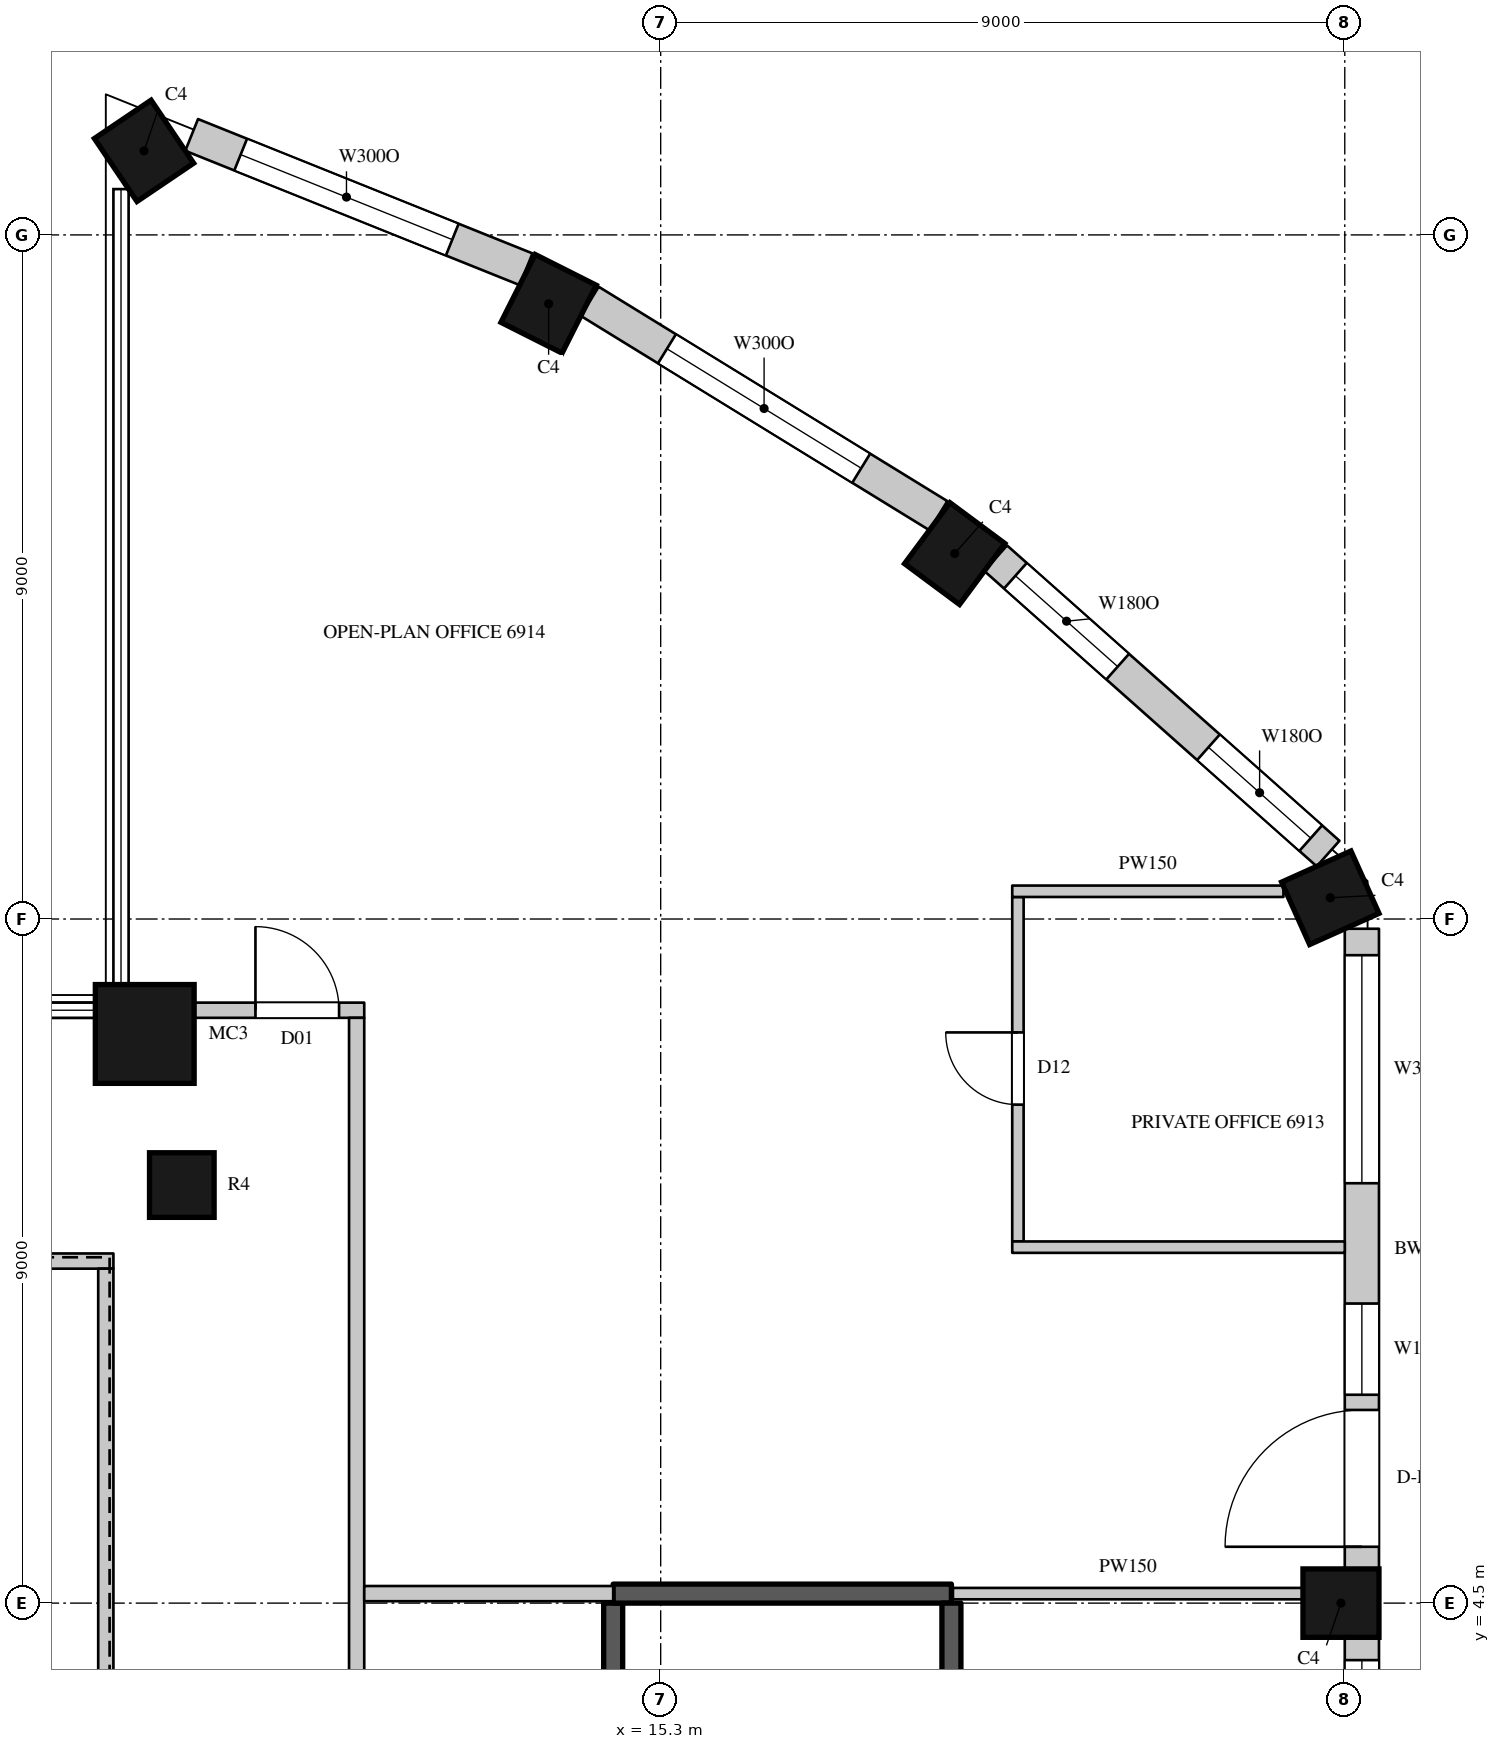
"""IFC4 building model, lengths in metres.
Left out: names, types, materials, properties, quantities, classifications, styles, units other than length and angle.
Written with IfcOpenShell. Run it as: python <this file> out.ifc"""

import sys

from ifc_helpers import new_model, si_unit, direction, frame, frame_2d, origin, origin_2d, place, context, subcontext, project, spatial, rectangle, circle, extrude, element, fill, save


model = new_model("IFC4")
c1 = context("Model", 3, precision=1e-05, world=origin(), true_north=direction((0.0, 1.0)))
c2 = subcontext(c1, "Body", "Model", "MODEL_VIEW")
j1 = project(units=[si_unit("LENGTHUNIT", "METRE"), si_unit("PLANEANGLEUNIT", "RADIAN")], contexts=[c1])
p1 = place(None, origin())
s1 = spatial("IfcSite", under=j1, at=p1, CompositionType="ELEMENT")
p2 = place(p1, origin())
s2 = spatial("IfcBuilding", under=s1, at=p2, CompositionType="ELEMENT")
p3 = place(p2, frame((0.0, 0.0, 304.9)))
s3 = spatial("IfcBuildingStorey", under=s2, at=p3, CompositionType="ELEMENT", Elevation=304.9)
p4 = place(p3, frame((8.503, 23.606, 0.0), z_axis=(0.0, 0.0, 1.0), x_axis=(-0.828469606019, -0.560034027451, 0.0)))
e1 = element("IfcColumn", 1, at=p4, inside=s3, PredefinedType="COLUMN", context=c2, shape_type="SweptSolid", body=[
    extrude(rectangle(XDim=0.9, YDim=1.0, at=origin_2d()), origin(), (0.0, 0.0, 1.0), 4.1),
])
p5 = place(p3, frame((8.512, 11.988, 0.0), z_axis=(0.0, 0.0, 1.0), x_axis=(1.0, 0.0, 0.0)))
e2 = element("IfcColumn", 2, at=p5, inside=s3, PredefinedType="COLUMN", context=c2, shape_type="SweptSolid", body=[
    extrude(circle(Radius=0.65, at=origin_2d()), origin(), (0.0, 0.0, 1.0), 4.1),
])
for number, where, z_axis, x_axis in (
    (3, (24.25, 4.5, 0.0), (0.0, 0.0, 1.0), (0.0, 1.0, 0.0)),
    (4, (24.11, 13.78, 0.0), (0.0, 0.0, 1.0), (-0.41, 0.912, 0.0)),
    (5, (19.168, 18.308, 0.0), (0.0, 0.0, 1.0), (-0.803, 0.596, 0.0)),
    (6, (13.826, 21.594, 0.0), (0.0, 0.0, 1.0), (-0.893, 0.45, 0.0)),
):
    element("IfcColumn", number, at=place(p3, frame(where, z_axis=z_axis, x_axis=x_axis)), inside=s3, PredefinedType="COLUMN", context=c2, shape_type="SweptSolid", body=[
        extrude(rectangle(XDim=0.9, YDim=1.0, at=origin_2d()), origin(), (0.0, 0.0, 1.0), 4.1),
    ])
p6 = place(p3, frame((9.0, 10.0, 0.0), z_axis=(0.0, 0.0, 1.0), x_axis=(1.0, 0.0, 0.0)))
e7 = element("IfcColumn", 7, at=p6, inside=s3, PredefinedType="COLUMN", context=c2, shape_type="SweptSolid", body=[
    extrude(circle(Radius=0.425, at=origin_2d()), origin(), (0.0, 0.0, 1.0), 4.1),
])
p7 = place(p3, frame((24.525, -4.05, 0.0), z_axis=(0.0, 0.0, 1.0), x_axis=(0.0, 1.0, 0.0)))
e8 = element("IfcWall", 8, at=p7, inside=s3, PredefinedType="SOLIDWALL", context=c2, shape_type="SweptSolid", body=[
    extrude(rectangle(XDim=8.1, YDim=0.45, at=frame_2d((4.05, 0.0))), origin(), (0.0, 0.0, 1.0), 3.8),
])
p8 = place(p7, frame((0.3, 0.0, 1.05)))
e9 = element("IfcOpeningElement", 9, at=p8, cuts=e8, PredefinedType="OPENING", context=c2, shape_type="SweptSolid", body=[
    extrude(rectangle(XDim=3.0, YDim=2.4, at=frame_2d((1.5, 1.2))), frame((0.0, 0.235, 0.0), z_axis=(0.0, -1.0, 0.0), x_axis=(1.0, 0.0, 0.0)), (0.0, 0.0, 1.0), 0.47),
])
p9 = place(p7, frame((4.8, 0.0, 1.05)))
e10 = element("IfcOpeningElement", 10, at=p9, cuts=e8, PredefinedType="OPENING", context=c2, shape_type="SweptSolid", body=[
    extrude(rectangle(XDim=3.0, YDim=2.4, at=frame_2d((1.5, 1.2))), frame((0.0, 0.235, 0.0), z_axis=(0.0, -1.0, 0.0), x_axis=(1.0, 0.0, 0.0)), (0.0, 0.0, 1.0), 0.47),
])
p10 = place(p3, frame((24.525, 4.95, 0.0), z_axis=(0.0, 0.0, 1.0), x_axis=(0.0, 1.0, 0.0)))
e11 = element("IfcWall", 11, at=p10, inside=s3, PredefinedType="SOLIDWALL", context=c2, shape_type="SweptSolid", body=[
    extrude(rectangle(XDim=8.422, YDim=0.45, at=frame_2d((4.211, 0.0))), origin(), (0.0, 0.0, 1.0), 3.8),
])
p11 = place(p10, frame((0.291, 0.0, 0.0)))
e12 = element("IfcOpeningElement", 12, at=p11, cuts=e11, PredefinedType="OPENING", context=c2, shape_type="SweptSolid", body=[
    extrude(rectangle(XDim=1.8, YDim=2.4, at=frame_2d((0.9, 1.2))), frame((0.0, 0.235, 0.0), z_axis=(0.0, -1.0, 0.0), x_axis=(1.0, 0.0, 0.0)), (0.0, 0.0, 1.0), 0.47),
])
p12 = place(p10, frame((2.291, 0.0, 1.05)))
e13 = element("IfcOpeningElement", 13, at=p12, cuts=e11, PredefinedType="OPENING", context=c2, shape_type="SweptSolid", body=[
    extrude(rectangle(XDim=1.2, YDim=2.4, at=frame_2d((0.6, 1.2))), frame((0.0, 0.235, 0.0), z_axis=(0.0, -1.0, 0.0), x_axis=(1.0, 0.0, 0.0)), (0.0, 0.0, 1.0), 0.47),
])
p13 = place(p10, frame((5.074, 0.0, 1.05)))
e14 = element("IfcOpeningElement", 14, at=p13, cuts=e11, PredefinedType="OPENING", context=c2, shape_type="SweptSolid", body=[
    extrude(rectangle(XDim=3.0, YDim=2.4, at=frame_2d((1.5, 1.2))), frame((0.0, 0.235, 0.0), z_axis=(0.0, -1.0, 0.0), x_axis=(1.0, 0.0, 0.0)), (0.0, 0.0, 1.0), 0.47),
])
p14 = place(p3, frame((24.081, 14.361, 0.0), z_axis=(0.0, 0.0, 1.0), x_axis=(-0.747570482973, 0.664182484704, 0.0)))
e15 = element("IfcWall", 15, at=p14, inside=s3, PredefinedType="SOLIDWALL", context=c2, shape_type="SweptSolid", body=[
    extrude(rectangle(XDim=5.85, YDim=0.45, at=frame_2d((2.925, 0.0))), origin(), (0.0, 0.0, 1.0), 3.8),
])
p15 = place(p14, frame((0.305, 0.0, 1.05)))
e16 = element("IfcOpeningElement", 16, at=p15, cuts=e15, PredefinedType="OPENING", context=c2, shape_type="SweptSolid", body=[
    extrude(rectangle(XDim=1.8, YDim=2.4, at=frame_2d((0.9, 1.2))), frame((0.0, 0.235, 0.0), z_axis=(0.0, -1.0, 0.0), x_axis=(1.0, 0.0, 0.0)), (0.0, 0.0, 1.0), 0.47),
])
p16 = place(p14, frame((3.703, 0.0, 1.05)))
e17 = element("IfcOpeningElement", 17, at=p16, cuts=e15, PredefinedType="OPENING", context=c2, shape_type="SweptSolid", body=[
    extrude(rectangle(XDim=1.8, YDim=2.4, at=frame_2d((0.9, 1.2))), frame((0.0, 0.235, 0.0), z_axis=(0.0, -1.0, 0.0), x_axis=(1.0, 0.0, 0.0)), (0.0, 0.0, 1.0), 0.47),
])
p17 = place(p3, frame((18.953, 18.806, 0.0), z_axis=(0.0, 0.0, 1.0), x_axis=(-0.851860664503, 0.523768468193, 0.0)))
e18 = element("IfcWall", 18, at=p17, inside=s3, PredefinedType="SOLIDWALL", context=c2, shape_type="SweptSolid", body=[
    extrude(rectangle(XDim=5.384, YDim=0.45, at=frame_2d((2.692, 0.0))), origin(), (0.0, 0.0, 1.0), 3.8),
])
p18 = place(p17, frame((1.192, 0.0, 1.05)))
e19 = element("IfcOpeningElement", 19, at=p18, cuts=e18, PredefinedType="OPENING", context=c2, shape_type="SweptSolid", body=[
    extrude(rectangle(XDim=3.0, YDim=2.4, at=frame_2d((1.5, 1.2))), frame((0.0, 0.235, 0.0), z_axis=(0.0, -1.0, 0.0), x_axis=(1.0, 0.0, 0.0)), (0.0, 0.0, 1.0), 0.47),
])
p19 = place(p3, frame((13.529, 22.048, 0.0), z_axis=(0.0, 0.0, 1.0), x_axis=(-0.927957332619, 0.372686448424, 0.0)))
e20 = element("IfcWall", 20, at=p19, inside=s3, PredefinedType="SOLIDWALL", context=c2, shape_type="SweptSolid", body=[
    extrude(rectangle(XDim=4.741, YDim=0.45, at=frame_2d((2.371, 0.0))), origin(), (0.0, 0.0, 1.0), 3.8),
])
p20 = place(p19, frame((1.047, 0.0, 1.05)))
e21 = element("IfcOpeningElement", 21, at=p20, cuts=e20, PredefinedType="OPENING", context=c2, shape_type="SweptSolid", body=[
    extrude(rectangle(XDim=3.0, YDim=2.4, at=frame_2d((1.5, 1.2))), frame((0.0, 0.235, 0.0), z_axis=(0.0, -1.0, 0.0), x_axis=(1.0, 0.0, 0.0)), (0.0, 0.0, 1.0), 0.47),
])
p21 = place(p3, frame((4.52, 9.0, 0.0), z_axis=(0.0, 0.0, 1.0), x_axis=(1.0, 0.0, 0.0)))
e22 = element("IfcWall", 22, at=p21, inside=s3, PredefinedType="PARTITIONING", context=c2, shape_type="SweptSolid", body=[
    extrude(rectangle(XDim=3.58, YDim=0.2, at=frame_2d((1.79, 0.0))), origin(), (0.0, 0.0, 1.0), 3.8),
])
p22 = place(p3, frame((6.75, 12.3, 0.0), z_axis=(0.0, 0.0, 1.0), x_axis=(1.0, 0.0, 0.0)))
e23 = element("IfcWall", 23, at=p22, inside=s3, PredefinedType="PARTITIONING", context=c2, shape_type="SweptSolid", body=[
    extrude(rectangle(XDim=1.156, YDim=0.2, at=frame_2d((0.578, 0.0))), origin(), (0.0, 0.0, 1.0), 3.8),
])
p23 = place(p3, frame((8.0, -8.9, 0.0), z_axis=(0.0, 0.0, 1.0), x_axis=(0.0, 1.0, 0.0)))
e24 = element("IfcWall", 24, at=p23, inside=s3, PredefinedType="PARTITIONING", context=c2, shape_type="SweptSolid", body=[
    extrude(rectangle(XDim=17.8, YDim=0.2, at=frame_2d((8.9, 0.0))), origin(), (0.0, 0.0, 1.0), 3.8),
])
p24 = place(p3, frame((9.119, 12.3, 0.0), z_axis=(0.0, 0.0, 1.0), x_axis=(1.0, 0.0, 0.0)))
e25 = element("IfcWall", 25, at=p24, inside=s3, PredefinedType="PARTITIONING", context=c2, shape_type="SweptSolid", body=[
    extrude(rectangle(XDim=2.281, YDim=0.2, at=frame_2d((1.141, 0.0))), origin(), (0.0, 0.0, 1.0), 3.8),
])
p25 = place(p24, frame((0.85, 0.0, 0.0)))
e26 = element("IfcOpeningElement", 26, at=p25, cuts=e25, PredefinedType="OPENING", context=c2, shape_type="SweptSolid", body=[
    extrude(rectangle(XDim=1.1, YDim=2.4, at=frame_2d((0.55, 1.2))), frame((0.0, 0.11, 0.0), z_axis=(0.0, -1.0, 0.0), x_axis=(1.0, 0.0, 0.0)), (0.0, 0.0, 1.0), 0.22),
])
p26 = place(p3, frame((11.3, -12.3, 0.0), z_axis=(0.0, 0.0, 1.0), x_axis=(0.0, 1.0, 0.0)))
e27 = element("IfcWall", 27, at=p26, inside=s3, PredefinedType="PARTITIONING", context=c2, shape_type="SweptSolid", body=[
    extrude(rectangle(XDim=24.5, YDim=0.2, at=frame_2d((12.25, 0.0))), origin(), (0.0, 0.0, 1.0), 3.8),
])
p27 = place(p26, frame((10.15, 0.0, 0.0)))
e28 = element("IfcOpeningElement", 28, at=p27, cuts=e27, PredefinedType="OPENING", context=c2, shape_type="SweptSolid", body=[
    extrude(rectangle(XDim=1.5, YDim=2.4, at=frame_2d((0.75, 1.2))), frame((0.0, 0.11, 0.0), z_axis=(0.0, -1.0, 0.0), x_axis=(1.0, 0.0, 0.0)), (0.0, 0.0, 1.0), 0.22),
])
p28 = place(p3, frame((11.4, 4.625, 0.0), z_axis=(0.0, 0.0, 1.0), x_axis=(1.0, 0.0, 0.0)))
e29 = element("IfcWall", 29, at=p28, inside=s3, PredefinedType="PARTITIONING", context=c2, shape_type="SweptSolid", body=[
    extrude(rectangle(XDim=3.275, YDim=0.2, at=frame_2d((1.638, 0.0))), origin(), (0.0, 0.0, 1.0), 3.8),
])
p29 = place(p3, frame((19.145, 4.625, 0.0), z_axis=(0.0, 0.0, 1.0), x_axis=(1.0, 0.0, 0.0)))
e30 = element("IfcWall", 30, at=p29, inside=s3, PredefinedType="PARTITIONING", context=c2, shape_type="SweptSolid", body=[
    extrude(rectangle(XDim=4.605, YDim=0.15, at=frame_2d((2.302, 0.0))), origin(), (0.0, 0.0, 1.0), 3.8),
])
p30 = place(p3, frame((20.0, 9.258, 0.0), z_axis=(0.0, 0.0, 1.0), x_axis=(0.0, 1.0, 0.0)))
e31 = element("IfcWall", 31, at=p30, inside=s3, PredefinedType="PARTITIONING", context=c2, shape_type="SweptSolid", body=[
    extrude(rectangle(XDim=4.532, YDim=0.15, at=frame_2d((2.266, 0.0))), origin(), (0.0, 0.0, 1.0), 3.8),
])
p31 = place(p30, frame((1.8, 0.0, 0.0)))
e32 = element("IfcOpeningElement", 32, at=p31, cuts=e31, PredefinedType="OPENING", context=c2, shape_type="SweptSolid", body=[
    extrude(rectangle(XDim=0.95, YDim=2.2, at=frame_2d((0.475, 1.1))), frame((0.0, 0.085, 0.0), z_axis=(0.0, -1.0, 0.0), x_axis=(1.0, 0.0, 0.0)), (0.0, 0.0, 1.0), 0.17),
])
p32 = place(p3, frame((19.925, 9.183, 0.0), z_axis=(0.0, 0.0, 1.0), x_axis=(1.0, 0.0, 0.0)))
e33 = element("IfcWall", 33, at=p32, inside=s3, PredefinedType="PARTITIONING", context=c2, shape_type="SweptSolid", body=[
    extrude(rectangle(XDim=4.375, YDim=0.15, at=frame_2d((2.188, 0.0))), origin(), (0.0, 0.0, 1.0), 3.15),
])
p33 = place(p3, frame((19.925, 13.865, 0.0), z_axis=(0.0, 0.0, 1.0), x_axis=(1.0, 0.0, 0.0)))
e34 = element("IfcWall", 34, at=p33, inside=s3, PredefinedType="PARTITIONING", context=c2, shape_type="SweptSolid", body=[
    extrude(rectangle(XDim=3.568, YDim=0.15, at=frame_2d((1.784, 0.0))), origin(), (0.0, 0.0, 1.0), 3.8),
])
p34 = place(p3, frame((14.675, -4.5, 0.0), z_axis=(0.0, 0.0, 1.0), x_axis=(0.0, 1.0, 0.0)))
e35 = element("IfcWall", 35, at=p34, inside=s3, PredefinedType="SHEAR", context=c2, shape_type="SweptSolid", body=[
    extrude(rectangle(XDim=9.0, YDim=0.25, at=frame_2d((4.5, 0.0))), origin(), (0.0, 0.0, 1.0), 3.8),
])
p35 = place(p34, frame((0.45, 0.0, 0.0)))
e36 = element("IfcOpeningElement", 36, at=p35, cuts=e35, PredefinedType="OPENING", context=c2, shape_type="SweptSolid", body=[
    extrude(rectangle(XDim=1.1, YDim=2.2, at=frame_2d((0.55, 1.1))), frame((0.0, 0.135, 0.0), z_axis=(0.0, -1.0, 0.0), x_axis=(1.0, 0.0, 0.0)), (0.0, 0.0, 1.0), 0.27),
])
p36 = place(p3, frame((14.675, 4.625, 0.0), z_axis=(0.0, 0.0, 1.0), x_axis=(1.0, 0.0, 0.0)))
e37 = element("IfcWall", 37, at=p36, inside=s3, PredefinedType="SHEAR", context=c2, shape_type="SweptSolid", body=[
    extrude(rectangle(XDim=4.45, YDim=0.25, at=frame_2d((2.225, 0.0))), origin(), (0.0, 0.0, 1.0), 3.8),
])
p37 = place(p3, frame((19.125, -4.5, 0.0), z_axis=(0.0, 0.0, 1.0), x_axis=(0.0, 1.0, 0.0)))
e38 = element("IfcWall", 38, at=p37, inside=s3, PredefinedType="SHEAR", context=c2, shape_type="SweptSolid", body=[
    extrude(rectangle(XDim=9.0, YDim=0.25, at=frame_2d((4.5, 0.0))), origin(), (0.0, 0.0, 1.0), 3.8),
])
p38 = place(p9, origin())
e39 = element("IfcWindow", 39, at=p38, inside=s3, PartitioningType="SINGLE_PANEL", PredefinedType="WINDOW", context=c2, shape_type="SweptSolid", body=[
    extrude(rectangle(XDim=3.0, YDim=2.4, at=frame_2d((1.5, 1.2))), frame((0.0, 0.135, 0.0), z_axis=(0.0, -1.0, 0.0), x_axis=(1.0, 0.0, 0.0)), (0.0, 0.0, 1.0), 0.06),
])
fill(e10, e39)
p39 = place(p11, origin())
e40 = element("IfcDoor", 40, at=p39, inside=s3, OperationType="SLIDING_TO_LEFT", PredefinedType="DOOR", context=c2, shape_type="SweptSolid", body=[
    extrude(rectangle(XDim=1.8, YDim=2.4, at=frame_2d((0.9, 1.2))), frame((0.0, 0.13, 0.0), z_axis=(0.0, -1.0, 0.0), x_axis=(1.0, 0.0, 0.0)), (0.0, 0.0, 1.0), 0.05),
])
fill(e12, e40)
p40 = place(p12, origin())
e41 = element("IfcWindow", 41, at=p40, inside=s3, PartitioningType="SINGLE_PANEL", PredefinedType="WINDOW", context=c2, shape_type="SweptSolid", body=[
    extrude(rectangle(XDim=1.2, YDim=2.4, at=frame_2d((0.6, 1.2))), frame((0.0, 0.135, 0.0), z_axis=(0.0, -1.0, 0.0), x_axis=(1.0, 0.0, 0.0)), (0.0, 0.0, 1.0), 0.06),
])
fill(e13, e41)
p41 = place(p13, origin())
e42 = element("IfcWindow", 42, at=p41, inside=s3, PartitioningType="SINGLE_PANEL", PredefinedType="WINDOW", context=c2, shape_type="SweptSolid", body=[
    extrude(rectangle(XDim=3.0, YDim=2.4, at=frame_2d((1.5, 1.2))), frame((0.0, 0.135, 0.0), z_axis=(0.0, -1.0, 0.0), x_axis=(1.0, 0.0, 0.0)), (0.0, 0.0, 1.0), 0.06),
])
fill(e14, e42)
p42 = place(p15, origin())
e43 = element("IfcWindow", 43, at=p42, inside=s3, PartitioningType="SINGLE_PANEL", PredefinedType="WINDOW", context=c2, shape_type="SweptSolid", body=[
    extrude(rectangle(XDim=1.8, YDim=2.4, at=frame_2d((0.9, 1.2))), frame((0.0, 0.135, 0.0), z_axis=(0.0, -1.0, 0.0), x_axis=(1.0, 0.0, 0.0)), (0.0, 0.0, 1.0), 0.06),
])
fill(e16, e43)
p43 = place(p16, origin())
e44 = element("IfcWindow", 44, at=p43, inside=s3, PartitioningType="SINGLE_PANEL", PredefinedType="WINDOW", context=c2, shape_type="SweptSolid", body=[
    extrude(rectangle(XDim=1.8, YDim=2.4, at=frame_2d((0.9, 1.2))), frame((0.0, 0.135, 0.0), z_axis=(0.0, -1.0, 0.0), x_axis=(1.0, 0.0, 0.0)), (0.0, 0.0, 1.0), 0.06),
])
fill(e17, e44)
p44 = place(p18, origin())
e45 = element("IfcWindow", 45, at=p44, inside=s3, PartitioningType="SINGLE_PANEL", PredefinedType="WINDOW", context=c2, shape_type="SweptSolid", body=[
    extrude(rectangle(XDim=3.0, YDim=2.4, at=frame_2d((1.5, 1.2))), frame((0.0, 0.135, 0.0), z_axis=(0.0, -1.0, 0.0), x_axis=(1.0, 0.0, 0.0)), (0.0, 0.0, 1.0), 0.06),
])
fill(e19, e45)
p45 = place(p20, origin())
e46 = element("IfcWindow", 46, at=p45, inside=s3, PartitioningType="SINGLE_PANEL", PredefinedType="WINDOW", context=c2, shape_type="SweptSolid", body=[
    extrude(rectangle(XDim=3.0, YDim=2.4, at=frame_2d((1.5, 1.2))), frame((0.0, 0.135, 0.0), z_axis=(0.0, -1.0, 0.0), x_axis=(1.0, 0.0, 0.0)), (0.0, 0.0, 1.0), 0.06),
])
fill(e21, e46)
p46 = place(p25, origin())
e47 = element("IfcDoor", 47, at=p46, inside=s3, OperationType="SINGLE_SWING_LEFT", PredefinedType="DOOR", context=c2, shape_type="SweptSolid", body=[
    extrude(rectangle(XDim=1.1, YDim=2.4, at=frame_2d((0.55, 1.2))), frame((0.0, 0.025, 0.0), z_axis=(0.0, -1.0, 0.0), x_axis=(1.0, 0.0, 0.0)), (0.0, 0.0, 1.0), 0.05),
])
fill(e26, e47)
p47 = place(p31, origin())
e48 = element("IfcDoor", 48, at=p47, inside=s3, OperationType="SINGLE_SWING_RIGHT", PredefinedType="DOOR", context=c2, shape_type="SweptSolid", body=[
    extrude(rectangle(XDim=0.95, YDim=2.2, at=frame_2d((0.475, 1.1))), frame((0.0, 0.025, 0.0), z_axis=(0.0, -1.0, 0.0), x_axis=(1.0, 0.0, 0.0)), (0.0, 0.0, 1.0), 0.05),
])
fill(e32, e48)
save(model, sys.argv[1])
